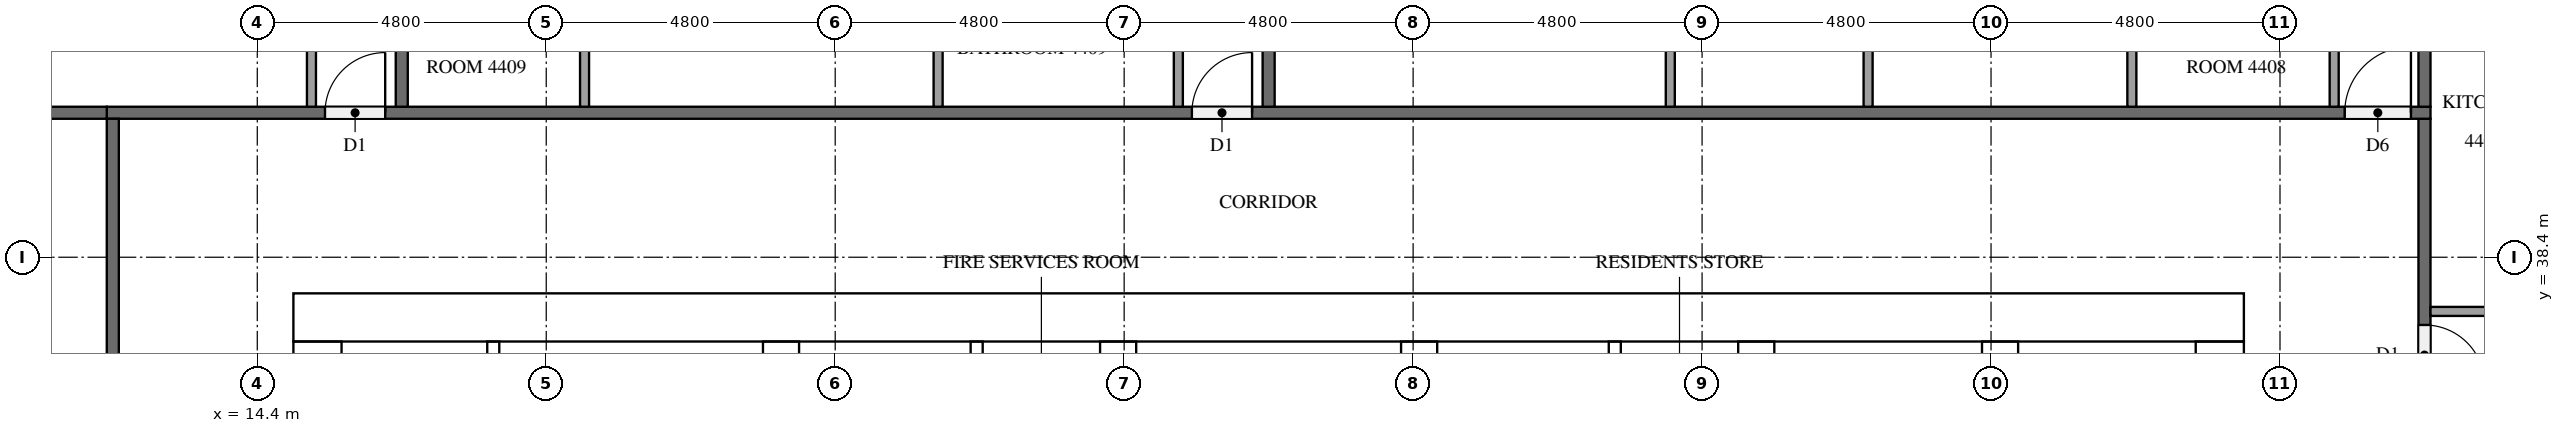
"""IFC4 building model, lengths in metres.
Left out: names, types, materials, properties, quantities, classifications, styles, units other than length and angle.
Written with IfcOpenShell. Run it as: python <this file> out.ifc"""

import sys

from ifc_helpers import new_model, si_unit, direction, frame, frame_2d, origin, place, context, subcontext, project, spatial, rectangle, extrude, element, fill, save


model = new_model("IFC4")
c1 = context("Model", 3, precision=1e-05, world=origin(), true_north=direction((0.0, 1.0)))
c2 = subcontext(c1, "Body", "Model", "MODEL_VIEW")
j1 = project(units=[si_unit("LENGTHUNIT", "METRE"), si_unit("PLANEANGLEUNIT", "RADIAN")], contexts=[c1])
p1 = place(None, origin())
s1 = spatial("IfcSite", under=j1, at=p1, CompositionType="ELEMENT")
p2 = place(p1, origin())
s2 = spatial("IfcBuilding", under=s1, at=p2, CompositionType="ELEMENT")
p3 = place(p2, frame((0.0, 0.0, 170.0)))
s3 = spatial("IfcBuildingStorey", under=s2, at=p3, CompositionType="ELEMENT", Elevation=170.0)
p4 = place(p3, frame((15.0, 37.4, 0.0), z_axis=(0.0, 0.0, 1.0), x_axis=(1.0, 0.0, 0.0)))
e1 = element("IfcWall", 1, at=p4, inside=s3, PredefinedType="SHEAR", context=c2, shape_type="SweptSolid", body=[
    extrude(rectangle(XDim=32.4, YDim=0.8, at=frame_2d((16.2, 0.0))), origin(), (0.0, 0.0, 1.0), 3.1),
])
p5 = place(p4, frame((15.3, 0.0, 0.0)))
e2 = element("IfcOpeningElement", 2, at=p5, cuts=e1, PredefinedType="OPENING", context=c2, shape_type="SweptSolid", body=[
    extrude(rectangle(XDim=1.8, YDim=2.1, at=frame_2d((0.9, 1.05))), frame((0.0, 0.41, 0.0), z_axis=(0.0, -1.0, 0.0), x_axis=(1.0, 0.0, 0.0)), (0.0, 0.0, 1.0), 0.82),
])
p6 = place(p4, frame((1.51, 0.0, 0.0)))
e3 = element("IfcOpeningElement", 3, at=p6, cuts=e1, PredefinedType="OPENING", context=c2, shape_type="SweptSolid", body=[
    extrude(rectangle(XDim=1.0, YDim=2.1, at=frame_2d((0.5, 1.05))), frame((0.0, 0.41, 0.0), z_axis=(0.0, -1.0, 0.0), x_axis=(1.0, 0.0, 0.0)), (0.0, 0.0, 1.0), 0.82),
])
p7 = place(p4, frame((5.11, 0.0, 0.0)))
e4 = element("IfcOpeningElement", 4, at=p7, cuts=e1, PredefinedType="OPENING", context=c2, shape_type="SweptSolid", body=[
    extrude(rectangle(XDim=1.0, YDim=2.1, at=frame_2d((0.5, 1.05))), frame((0.0, 0.41, 0.0), z_axis=(0.0, -1.0, 0.0), x_axis=(1.0, 0.0, 0.0)), (0.0, 0.0, 1.0), 0.82),
])
p8 = place(p3, frame((15.4, 15.8, 0.0), z_axis=(0.0, 0.0, 1.0), x_axis=(0.0, 1.0, 0.0)))
e5 = element("IfcWall", 5, at=p8, inside=s3, PredefinedType="SHEAR", context=c2, shape_type="SweptSolid", body=[
    extrude(rectangle(XDim=21.2, YDim=0.8, at=frame_2d((10.6, 0.0))), origin(), (0.0, 0.0, 1.0), 3.1),
])
p9 = place(p8, frame((4.96, 0.0, 0.0)))
e6 = element("IfcOpeningElement", 6, at=p9, cuts=e5, PredefinedType="OPENING", context=c2, shape_type="SweptSolid", body=[
    extrude(rectangle(XDim=1.2, YDim=2.1, at=frame_2d((0.6, 1.05))), frame((0.0, 0.41, 0.0), z_axis=(0.0, -1.0, 0.0), x_axis=(1.0, 0.0, 0.0)), (0.0, 0.0, 1.0), 0.82),
])
p10 = place(p3, frame((47.0, 15.8, 0.0), z_axis=(0.0, 0.0, 1.0), x_axis=(0.0, 1.0, 0.0)))
e7 = element("IfcWall", 7, at=p10, inside=s3, PredefinedType="SHEAR", context=c2, shape_type="SweptSolid", body=[
    extrude(rectangle(XDim=21.2, YDim=0.8, at=frame_2d((10.6, 0.0))), origin(), (0.0, 0.0, 1.0), 3.1),
])
p11 = place(p10, frame((10.3, 0.0, 0.0)))
e8 = element("IfcOpeningElement", 8, at=p11, cuts=e7, PredefinedType="OPENING", context=c2, shape_type="SweptSolid", body=[
    extrude(rectangle(XDim=1.2, YDim=2.1, at=frame_2d((0.6, 1.05))), frame((0.0, 0.41, 0.0), z_axis=(0.0, -1.0, 0.0), x_axis=(1.0, 0.0, 0.0)), (0.0, 0.0, 1.0), 0.82),
])
p12 = place(p3, frame((23.1, 15.8, 0.0), z_axis=(0.0, 0.0, 1.0), x_axis=(0.0, 1.0, 0.0)))
e9 = element("IfcWall", 9, at=p12, inside=s3, PredefinedType="SHEAR", context=c2, shape_type="SweptSolid", body=[
    extrude(rectangle(XDim=21.2, YDim=0.6, at=frame_2d((10.6, 0.0))), origin(), (0.0, 0.0, 1.0), 3.1),
])
p13 = place(p3, frame((39.3, 27.75, 0.0), z_axis=(0.0, 0.0, 1.0), x_axis=(0.0, 1.0, 0.0)))
e10 = element("IfcWall", 10, at=p13, inside=s3, PredefinedType="SHEAR", context=c2, shape_type="SweptSolid", body=[
    extrude(rectangle(XDim=9.25, YDim=0.6, at=frame_2d((4.625, 0.0))), origin(), (0.0, 0.0, 1.0), 3.1),
])
p14 = place(p3, frame((43.35, 27.75, 0.0), z_axis=(0.0, 0.0, 1.0), x_axis=(0.0, 1.0, 0.0)))
e11 = element("IfcWall", 11, at=p14, inside=s3, PredefinedType="SHEAR", context=c2, shape_type="SweptSolid", body=[
    extrude(rectangle(XDim=9.25, YDim=0.6, at=frame_2d((4.625, 0.0))), origin(), (0.0, 0.0, 1.0), 3.1),
])
p15 = place(p14, frame((7.65, 0.0, 0.0)))
e12 = element("IfcOpeningElement", 12, at=p15, cuts=e11, PredefinedType="OPENING", context=c2, shape_type="SweptSolid", body=[
    extrude(rectangle(XDim=1.2, YDim=2.1, at=frame_2d((0.6, 1.05))), frame((0.0, 0.31, 0.0), z_axis=(0.0, -1.0, 0.0), x_axis=(1.0, 0.0, 0.0)), (0.0, 0.0, 1.0), 0.62),
])
for number, where, z_axis, x_axis in (
    (13, (28.7, 33.85, 0.0), (0.0, 0.0, 1.0), (0.0, 1.0, 0.0)),
    (14, (33.7, 33.85, 0.0), (0.0, 0.0, 1.0), (0.0, 1.0, 0.0)),
):
    element("IfcWall", number, at=place(p3, frame(where, z_axis=z_axis, x_axis=x_axis)), inside=s3, PredefinedType="SHEAR", context=c2, shape_type="SweptSolid", body=[
        extrude(rectangle(XDim=3.15, YDim=0.6, at=frame_2d((1.575, 0.0))), origin(), (0.0, 0.0, 1.0), 3.1),
    ])
p16 = place(p3, frame((18.32, 31.55, 0.0), z_axis=(0.0, 0.0, 1.0), x_axis=(0.0, 1.0, 0.0)))
e15 = element("IfcWall", 15, at=p16, inside=s3, PredefinedType="PARTITIONING", context=c2, shape_type="SweptSolid", body=[
    extrude(rectangle(XDim=5.45, YDim=0.2, at=frame_2d((2.725, 0.0))), origin(), (0.0, 0.0, 1.0), 3.1),
])
for number, where, z_axis, x_axis in (
    (16, (26.35, 33.85, 0.0), (0.0, 0.0, 1.0), (0.0, 1.0, 0.0)),
    (17, (36.95, 33.85, 0.0), (0.0, 0.0, 1.0), (0.0, 1.0, 0.0)),
):
    element("IfcWall", number, at=place(p3, frame(where, z_axis=z_axis, x_axis=x_axis)), inside=s3, PredefinedType="PARTITIONING", context=c2, shape_type="SweptSolid", body=[
        extrude(rectangle(XDim=3.15, YDim=0.2, at=frame_2d((1.575, 0.0))), origin(), (0.0, 0.0, 1.0), 3.1),
    ])
p17 = place(p3, frame((50.4, 40.7, 0.0), z_axis=(0.0, 0.0, 1.0), x_axis=(0.0, -1.0, 0.0)))
e18 = element("IfcWall", 18, at=p17, inside=s3, PredefinedType="PARTITIONING", context=c2, shape_type="SweptSolid", body=[
    extrude(rectangle(XDim=28.6, YDim=0.2, at=frame_2d((14.3, 0.0))), origin(), (0.0, 0.0, 1.0), 3.1),
])
p18 = place(p17, frame((26.575, 0.0, 0.0)))
e19 = element("IfcOpeningElement", 19, at=p18, cuts=e18, PredefinedType="OPENING", context=c2, shape_type="SweptSolid", body=[
    extrude(rectangle(XDim=1.0, YDim=2.1, at=frame_2d((0.5, 1.05))), frame((0.0, 0.11, 0.0), z_axis=(0.0, -1.0, 0.0), x_axis=(1.0, 0.0, 0.0)), (0.0, 0.0, 1.0), 0.22),
])
p19 = place(p17, frame((25.025, 0.0, 0.0)))
e20 = element("IfcOpeningElement", 20, at=p19, cuts=e18, PredefinedType="OPENING", context=c2, shape_type="SweptSolid", body=[
    extrude(rectangle(XDim=1.0, YDim=2.1, at=frame_2d((0.5, 1.05))), frame((0.0, 0.11, 0.0), z_axis=(0.0, -1.0, 0.0), x_axis=(1.0, 0.0, 0.0)), (0.0, 0.0, 1.0), 0.22),
])
p20 = place(p17, frame((4.975, 0.0, 0.0)))
e21 = element("IfcOpeningElement", 21, at=p20, cuts=e18, PredefinedType="OPENING", context=c2, shape_type="SweptSolid", body=[
    extrude(rectangle(XDim=1.0, YDim=2.1, at=frame_2d((0.5, 1.05))), frame((0.0, 0.11, 0.0), z_axis=(0.0, -1.0, 0.0), x_axis=(1.0, 0.0, 0.0)), (0.0, 0.0, 1.0), 0.22),
])
p21 = place(p17, frame((3.425, 0.0, 0.0)))
e22 = element("IfcOpeningElement", 22, at=p21, cuts=e18, PredefinedType="OPENING", context=c2, shape_type="SweptSolid", body=[
    extrude(rectangle(XDim=1.0, YDim=2.1, at=frame_2d((0.5, 1.05))), frame((0.0, 0.11, 0.0), z_axis=(0.0, -1.0, 0.0), x_axis=(1.0, 0.0, 0.0)), (0.0, 0.0, 1.0), 0.22),
])
p22 = place(p3, frame((11.9, 40.8, 0.0), z_axis=(0.0, 0.0, 1.0), x_axis=(1.0, 0.0, 0.0)))
e23 = element("IfcWall", 23, at=p22, inside=s3, PredefinedType="PARTITIONING", context=c2, shape_type="SweptSolid", body=[
    extrude(rectangle(XDim=38.6, YDim=0.2, at=frame_2d((19.3, 0.0))), origin(), (0.0, 0.0, 1.0), 3.1),
])
p23 = place(p22, frame((37.175, 0.0, 0.0)))
e24 = element("IfcOpeningElement", 24, at=p23, cuts=e23, PredefinedType="OPENING", context=c2, shape_type="SweptSolid", body=[
    extrude(rectangle(XDim=1.1, YDim=2.1, at=frame_2d((0.55, 1.05))), frame((0.0, 0.11, 0.0), z_axis=(0.0, -1.0, 0.0), x_axis=(1.0, 0.0, 0.0)), (0.0, 0.0, 1.0), 0.22),
])
p24 = place(p22, frame((18.025, 0.0, 0.0)))
e25 = element("IfcOpeningElement", 25, at=p24, cuts=e23, PredefinedType="OPENING", context=c2, shape_type="SweptSolid", body=[
    extrude(rectangle(XDim=1.0, YDim=2.1, at=frame_2d((0.5, 1.05))), frame((0.0, 0.11, 0.0), z_axis=(0.0, -1.0, 0.0), x_axis=(1.0, 0.0, 0.0)), (0.0, 0.0, 1.0), 0.22),
])
p25 = place(p22, frame((3.625, 0.0, 0.0)))
e26 = element("IfcOpeningElement", 26, at=p25, cuts=e23, PredefinedType="OPENING", context=c2, shape_type="SweptSolid", body=[
    extrude(rectangle(XDim=1.0, YDim=2.1, at=frame_2d((0.5, 1.05))), frame((0.0, 0.11, 0.0), z_axis=(0.0, -1.0, 0.0), x_axis=(1.0, 0.0, 0.0)), (0.0, 0.0, 1.0), 0.22),
])
p26 = place(p3, frame((12.0, 12.1, 0.0), z_axis=(0.0, 0.0, 1.0), x_axis=(0.0, 1.0, 0.0)))
e27 = element("IfcWall", 27, at=p26, inside=s3, PredefinedType="PARTITIONING", context=c2, shape_type="SweptSolid", body=[
    extrude(rectangle(XDim=28.6, YDim=0.2, at=frame_2d((14.3, 0.0))), origin(), (0.0, 0.0, 1.0), 3.1),
])
p27 = place(p26, frame((19.375, 0.0, 0.0)))
e28 = element("IfcOpeningElement", 28, at=p27, cuts=e27, PredefinedType="OPENING", context=c2, shape_type="SweptSolid", body=[
    extrude(rectangle(XDim=1.0, YDim=2.1, at=frame_2d((0.5, 1.05))), frame((0.0, 0.11, 0.0), z_axis=(0.0, -1.0, 0.0), x_axis=(1.0, 0.0, 0.0)), (0.0, 0.0, 1.0), 0.22),
])
p28 = place(p26, frame((4.975, 0.0, 0.0)))
e29 = element("IfcOpeningElement", 29, at=p28, cuts=e27, PredefinedType="OPENING", context=c2, shape_type="SweptSolid", body=[
    extrude(rectangle(XDim=1.0, YDim=2.1, at=frame_2d((0.5, 1.05))), frame((0.0, 0.11, 0.0), z_axis=(0.0, -1.0, 0.0), x_axis=(1.0, 0.0, 0.0)), (0.0, 0.0, 1.0), 0.22),
])
p29 = place(p26, frame((3.425, 0.0, 0.0)))
e30 = element("IfcOpeningElement", 30, at=p29, cuts=e27, PredefinedType="OPENING", context=c2, shape_type="SweptSolid", body=[
    extrude(rectangle(XDim=1.0, YDim=2.1, at=frame_2d((0.5, 1.05))), frame((0.0, 0.11, 0.0), z_axis=(0.0, -1.0, 0.0), x_axis=(1.0, 0.0, 0.0)), (0.0, 0.0, 1.0), 0.22),
])
for number, where, z_axis, x_axis in (
    (31, (50.4, 40.9, 0.0), (0.0, 0.0, 1.0), (0.0, 1.0, 0.0)),
    (32, (31.2, 47.9, 0.0), (0.0, 0.0, 1.0), (0.0, -1.0, 0.0)),
    (33, (16.8, 47.9, 0.0), (0.0, 0.0, 1.0), (0.0, -1.0, 0.0)),
):
    element("IfcWall", number, at=place(p3, frame(where, z_axis=z_axis, x_axis=x_axis)), inside=s3, PredefinedType="PARTITIONING", context=c2, shape_type="SweptSolid", body=[
        extrude(rectangle(XDim=7.0, YDim=0.2, at=frame_2d((3.5, 0.0))), origin(), (0.0, 0.0, 1.0), 3.1),
    ])
p30 = place(p3, frame((0.1, 40.8, 0.0), z_axis=(0.0, 0.0, 1.0), x_axis=(1.0, 0.0, 0.0)))
e34 = element("IfcWall", 34, at=p30, inside=s3, PredefinedType="PARTITIONING", context=c2, shape_type="SweptSolid", body=[
    extrude(rectangle(XDim=11.8, YDim=0.2, at=frame_2d((5.9, 0.0))), origin(), (0.0, 0.0, 1.0), 3.1),
])
p31 = place(p3, frame((50.5, 37.5, 0.0), z_axis=(0.0, 0.0, 1.0), x_axis=(1.0, 0.0, 0.0)))
e35 = element("IfcWall", 35, at=p31, inside=s3, PredefinedType="PARTITIONING", context=c2, shape_type="SweptSolid", body=[
    extrude(rectangle(XDim=1.925, YDim=0.15, at=frame_2d((0.962, 0.0))), origin(), (0.0, 0.0, 1.0), 3.1),
])
for number, where, z_axis, x_axis in (
    (36, (45.539, 40.9, 0.0), (0.0, 0.0, 1.0), (0.0, 1.0, 0.0)),
    (37, (41.158, 40.9, 0.0), (0.0, 0.0, 1.0), (0.0, 1.0, 0.0)),
    (38, (37.872, 40.9, 0.0), (0.0, 0.0, 1.0), (0.0, 1.0, 0.0)),
):
    element("IfcWall", number, at=place(p3, frame(where, z_axis=z_axis, x_axis=x_axis)), inside=s3, PredefinedType="PARTITIONING", context=c2, shape_type="SweptSolid", body=[
        extrude(rectangle(XDim=2.075, YDim=0.15, at=frame_2d((1.038, 0.0))), origin(), (0.0, 0.0, 1.0), 3.1),
    ])
p32 = place(p3, frame((48.9, 40.9, 0.0), z_axis=(0.0, 0.0, 1.0), x_axis=(0.0, 1.0, 0.0)))
e39 = element("IfcWall", 39, at=p32, inside=s3, PredefinedType="PARTITIONING", context=c2, shape_type="SweptSolid", body=[
    extrude(rectangle(XDim=2.225, YDim=0.15, at=frame_2d((1.113, 0.0))), origin(), (0.0, 0.0, 1.0), 3.1),
])
for number, where, z_axis, x_axis in (
    (40, (25.71, 40.9, 0.0), (0.0, 0.0, 1.0), (0.0, 1.0, 0.0)),
    (41, (19.836, 40.9, 0.0), (0.0, 0.0, 1.0), (0.0, 1.0, 0.0)),
):
    element("IfcWall", number, at=place(p3, frame(where, z_axis=z_axis, x_axis=x_axis)), inside=s3, PredefinedType="PARTITIONING", context=c2, shape_type="SweptSolid", body=[
        extrude(rectangle(XDim=2.075, YDim=0.15, at=frame_2d((1.038, 0.0))), origin(), (0.0, 0.0, 1.0), 3.1),
    ])
p33 = place(p3, frame((29.7, 40.9, 0.0), z_axis=(0.0, 0.0, 1.0), x_axis=(0.0, 1.0, 0.0)))
e42 = element("IfcWall", 42, at=p33, inside=s3, PredefinedType="PARTITIONING", context=c2, shape_type="SweptSolid", body=[
    extrude(rectangle(XDim=2.225, YDim=0.15, at=frame_2d((1.113, 0.0))), origin(), (0.0, 0.0, 1.0), 3.1),
])
p34 = place(p3, frame((15.3, 40.9, 0.0), z_axis=(0.0, 0.0, 1.0), x_axis=(0.0, 1.0, 0.0)))
e43 = element("IfcWall", 43, at=p34, inside=s3, PredefinedType="PARTITIONING", context=c2, shape_type="SweptSolid", body=[
    extrude(rectangle(XDim=2.525, YDim=0.15, at=frame_2d((1.263, 0.0))), origin(), (0.0, 0.0, 1.0), 3.1),
])
p35 = place(p5, origin())
e44 = element("IfcDoor", 44, at=p35, inside=s3, OperationType="DOUBLE_DOOR_SINGLE_SWING", PredefinedType="DOOR", context=c2, shape_type="SweptSolid", body=[
    extrude(rectangle(XDim=1.8, YDim=2.1, at=frame_2d((0.9, 1.05))), frame((0.0, 0.025, 0.0), z_axis=(0.0, -1.0, 0.0), x_axis=(1.0, 0.0, 0.0)), (0.0, 0.0, 1.0), 0.05),
])
fill(e2, e44)
p36 = place(p6, origin())
e45 = element("IfcDoor", 45, at=p36, inside=s3, OperationType="SINGLE_SWING_LEFT", PredefinedType="DOOR", context=c2, shape_type="SweptSolid", body=[
    extrude(rectangle(XDim=1.0, YDim=2.1, at=frame_2d((0.5, 1.05))), frame((0.0, 0.025, 0.0), z_axis=(0.0, -1.0, 0.0), x_axis=(1.0, 0.0, 0.0)), (0.0, 0.0, 1.0), 0.05),
])
fill(e3, e45)
p37 = place(p7, origin())
e46 = element("IfcDoor", 46, at=p37, inside=s3, OperationType="SINGLE_SWING_RIGHT", PredefinedType="DOOR", context=c2, shape_type="SweptSolid", body=[
    extrude(rectangle(XDim=1.0, YDim=2.1, at=frame_2d((0.5, 1.05))), frame((0.0, 0.025, 0.0), z_axis=(0.0, -1.0, 0.0), x_axis=(1.0, 0.0, 0.0)), (0.0, 0.0, 1.0), 0.05),
])
fill(e4, e46)
p38 = place(p21, origin())
e47 = element("IfcDoor", 47, at=p38, inside=s3, OperationType="SINGLE_SWING_RIGHT", PredefinedType="DOOR", context=c2, shape_type="SweptSolid", body=[
    extrude(rectangle(XDim=1.0, YDim=2.1, at=frame_2d((0.5, 1.05))), frame((0.0, 0.025, 0.0), z_axis=(0.0, -1.0, 0.0), x_axis=(1.0, 0.0, 0.0)), (0.0, 0.0, 1.0), 0.05),
])
fill(e22, e47)
p39 = place(p23, origin())
e48 = element("IfcDoor", 48, at=p39, inside=s3, OperationType="SINGLE_SWING_RIGHT", PredefinedType="DOOR", context=c2, shape_type="SweptSolid", body=[
    extrude(rectangle(XDim=1.1, YDim=2.1, at=frame_2d((0.55, 1.05))), frame((0.0, 0.025, 0.0), z_axis=(0.0, -1.0, 0.0), x_axis=(1.0, 0.0, 0.0)), (0.0, 0.0, 1.0), 0.05),
])
fill(e24, e48)
p40 = place(p24, origin())
e49 = element("IfcDoor", 49, at=p40, inside=s3, OperationType="SINGLE_SWING_RIGHT", PredefinedType="DOOR", context=c2, shape_type="SweptSolid", body=[
    extrude(rectangle(XDim=1.0, YDim=2.1, at=frame_2d((0.5, 1.05))), frame((0.0, 0.025, 0.0), z_axis=(0.0, -1.0, 0.0), x_axis=(1.0, 0.0, 0.0)), (0.0, 0.0, 1.0), 0.05),
])
fill(e25, e49)
p41 = place(p25, origin())
e50 = element("IfcDoor", 50, at=p41, inside=s3, OperationType="SINGLE_SWING_RIGHT", PredefinedType="DOOR", context=c2, shape_type="SweptSolid", body=[
    extrude(rectangle(XDim=1.0, YDim=2.1, at=frame_2d((0.5, 1.05))), frame((0.0, 0.025, 0.0), z_axis=(0.0, -1.0, 0.0), x_axis=(1.0, 0.0, 0.0)), (0.0, 0.0, 1.0), 0.05),
])
fill(e26, e50)
save(model, sys.argv[1])
